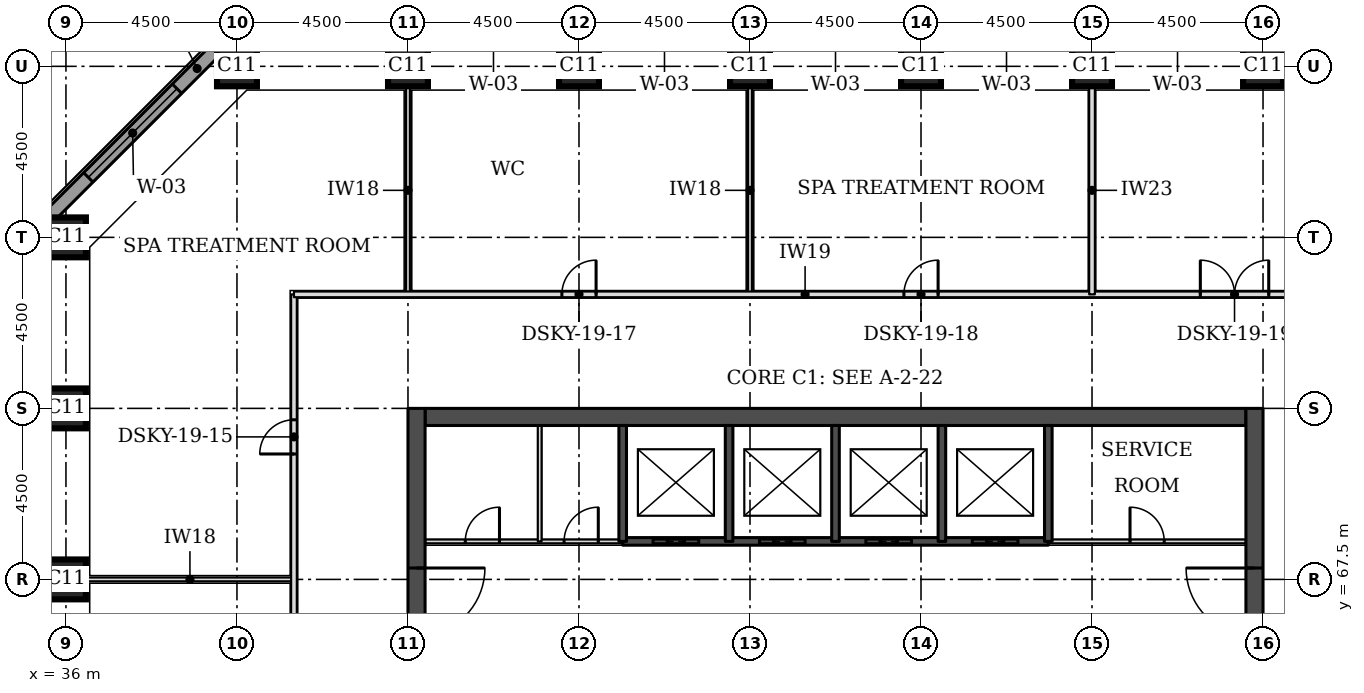
"""IFC4 building model, lengths in metres.
Left out: names, types, materials, properties, quantities, classifications, styles, units other than length and angle.
Written with IfcOpenShell. Run it as: python <this file> out.ifc"""

import sys

from ifc_helpers import new_model, si_unit, direction, frame, frame_2d, origin, origin_2d, place, context, subcontext, project, spatial, rectangle, extrude, element, fill, save


model = new_model("IFC4")
c1 = context("Model", 3, precision=1e-05, world=origin(), true_north=direction((0.0, 1.0)))
c2 = subcontext(c1, "Body", "Model", "MODEL_VIEW")
j1 = project(units=[si_unit("LENGTHUNIT", "METRE"), si_unit("PLANEANGLEUNIT", "RADIAN")], contexts=[c1])
p1 = place(None, origin())
s1 = spatial("IfcSite", under=j1, at=p1, CompositionType="ELEMENT")
p2 = place(p1, origin())
s2 = spatial("IfcBuilding", under=s1, at=p2, CompositionType="ELEMENT")
p3 = place(p2, frame((0.0, 0.0, 74.3)))
s3 = spatial("IfcBuildingStorey", under=s2, at=p3, CompositionType="ELEMENT", Elevation=74.3)
for number, where, z_axis, x_axis in (
    (1, (36.0, 67.5, 0.0), (0.0, 0.0, 1.0), (1.0, 0.0, 0.0)),
    (2, (36.0, 72.0, 0.0), (0.0, 0.0, 1.0), (1.0, 0.0, 0.0)),
    (3, (36.0, 76.5, 0.0), (0.0, 0.0, 1.0), (1.0, 0.0, 0.0)),
    (4, (40.5, 81.0, 0.0), (0.0, 0.0, 1.0), (1.0, 0.0, 0.0)),
    (5, (45.0, 81.0, 0.0), (0.0, 0.0, 1.0), (1.0, 0.0, 0.0)),
    (6, (49.5, 81.0, 0.0), (0.0, 0.0, 1.0), (1.0, 0.0, 0.0)),
    (7, (54.0, 81.0, 0.0), (0.0, 0.0, 1.0), (1.0, 0.0, 0.0)),
    (8, (58.5, 81.0, 0.0), (0.0, 0.0, 1.0), (1.0, 0.0, 0.0)),
    (9, (63.0, 81.0, 0.0), (0.0, 0.0, 1.0), (1.0, 0.0, 0.0)),
    (10, (67.5, 81.0, 0.0), (0.0, 0.0, 1.0), (1.0, 0.0, 0.0)),
):
    element("IfcColumn", number, at=place(p3, frame(where, z_axis=z_axis, x_axis=x_axis)), inside=s3, PredefinedType="COLUMN", context=c2, shape_type="SweptSolid", body=[
        extrude(rectangle(XDim=1.05, YDim=1.05, at=origin_2d()), origin(), (0.0, 0.0, 1.0), 4.6),
    ])
p4 = place(p3, frame((45.45, 71.775, 0.0), z_axis=(0.0, 0.0, 1.0), x_axis=(1.0, 0.0, 0.0)))
e11 = element("IfcWall", 11, at=p4, inside=s3, PredefinedType="SHEAR", context=c2, shape_type="SweptSolid", body=[
    extrude(rectangle(XDim=21.6, YDim=0.45, at=frame_2d((10.8, 0.0))), origin(), (0.0, 0.0, 1.0), 4.6),
])
p5 = place(p3, frame((45.225, 49.5, 0.0), z_axis=(0.0, 0.0, 1.0), x_axis=(0.0, 1.0, 0.0)))
e12 = element("IfcWall", 12, at=p5, inside=s3, PredefinedType="SHEAR", context=c2, shape_type="SweptSolid", body=[
    extrude(rectangle(XDim=22.5, YDim=0.45, at=frame_2d((11.25, 0.0))), origin(), (0.0, 0.0, 1.0), 4.6),
])
p6 = place(p5, frame((4.2, 0.0, 0.0)))
e13 = element("IfcOpeningElement", 13, at=p6, cuts=e12, PredefinedType="OPENING", context=c2, shape_type="SweptSolid", body=[
    extrude(rectangle(XDim=1.8, YDim=2.1, at=frame_2d((0.9, 1.05))), frame((0.0, 0.235, 0.0), z_axis=(0.0, -1.0, 0.0), x_axis=(1.0, 0.0, 0.0)), (0.0, 0.0, 1.0), 0.47),
])
p7 = place(p5, frame((6.9, 0.0, 0.0)))
e14 = element("IfcOpeningElement", 14, at=p7, cuts=e12, PredefinedType="OPENING", context=c2, shape_type="SweptSolid", body=[
    extrude(rectangle(XDim=1.1, YDim=2.1, at=frame_2d((0.55, 1.05))), frame((0.0, 0.235, 0.0), z_axis=(0.0, -1.0, 0.0), x_axis=(1.0, 0.0, 0.0)), (0.0, 0.0, 1.0), 0.47),
])
p8 = place(p5, frame((13.6, 0.0, 0.0)))
e15 = element("IfcOpeningElement", 15, at=p8, cuts=e12, PredefinedType="OPENING", context=c2, shape_type="SweptSolid", body=[
    extrude(rectangle(XDim=1.1, YDim=2.1, at=frame_2d((0.55, 1.05))), frame((0.0, 0.235, 0.0), z_axis=(0.0, -1.0, 0.0), x_axis=(1.0, 0.0, 0.0)), (0.0, 0.0, 1.0), 0.47),
])
p9 = place(p5, frame((16.5, 0.0, 0.0)))
e16 = element("IfcOpeningElement", 16, at=p9, cuts=e12, PredefinedType="OPENING", context=c2, shape_type="SweptSolid", body=[
    extrude(rectangle(XDim=1.8, YDim=2.1, at=frame_2d((0.9, 1.05))), frame((0.0, 0.235, 0.0), z_axis=(0.0, -1.0, 0.0), x_axis=(1.0, 0.0, 0.0)), (0.0, 0.0, 1.0), 0.47),
])
p10 = place(p3, frame((67.275, 49.5, 0.0), z_axis=(0.0, 0.0, 1.0), x_axis=(0.0, 1.0, 0.0)))
e17 = element("IfcWall", 17, at=p10, inside=s3, PredefinedType="SHEAR", context=c2, shape_type="SweptSolid", body=[
    extrude(rectangle(XDim=22.5, YDim=0.45, at=frame_2d((11.25, 0.0))), origin(), (0.0, 0.0, 1.0), 4.6),
])
p11 = place(p10, frame((4.2, 0.0, 0.0)))
e18 = element("IfcOpeningElement", 18, at=p11, cuts=e17, PredefinedType="OPENING", context=c2, shape_type="SweptSolid", body=[
    extrude(rectangle(XDim=1.8, YDim=2.1, at=frame_2d((0.9, 1.05))), frame((0.0, 0.235, 0.0), z_axis=(0.0, -1.0, 0.0), x_axis=(1.0, 0.0, 0.0)), (0.0, 0.0, 1.0), 0.47),
])
p12 = place(p10, frame((6.9, 0.0, 0.0)))
e19 = element("IfcOpeningElement", 19, at=p12, cuts=e17, PredefinedType="OPENING", context=c2, shape_type="SweptSolid", body=[
    extrude(rectangle(XDim=1.1, YDim=2.1, at=frame_2d((0.55, 1.05))), frame((0.0, 0.235, 0.0), z_axis=(0.0, -1.0, 0.0), x_axis=(1.0, 0.0, 0.0)), (0.0, 0.0, 1.0), 0.47),
])
p13 = place(p10, frame((13.6, 0.0, 0.0)))
e20 = element("IfcOpeningElement", 20, at=p13, cuts=e17, PredefinedType="OPENING", context=c2, shape_type="SweptSolid", body=[
    extrude(rectangle(XDim=1.1, YDim=2.1, at=frame_2d((0.55, 1.05))), frame((0.0, 0.235, 0.0), z_axis=(0.0, -1.0, 0.0), x_axis=(1.0, 0.0, 0.0)), (0.0, 0.0, 1.0), 0.47),
])
p14 = place(p10, frame((16.5, 0.0, 0.0)))
e21 = element("IfcOpeningElement", 21, at=p14, cuts=e17, PredefinedType="OPENING", context=c2, shape_type="SweptSolid", body=[
    extrude(rectangle(XDim=1.8, YDim=2.1, at=frame_2d((0.9, 1.05))), frame((0.0, 0.235, 0.0), z_axis=(0.0, -1.0, 0.0), x_axis=(1.0, 0.0, 0.0)), (0.0, 0.0, 1.0), 0.47),
])
p15 = place(p3, frame((40.261, 81.751, 0.0), z_axis=(0.0, 0.0, 1.0), x_axis=(-0.707106781187, -0.707106781187, 0.0)))
e22 = element("IfcWall", 22, at=p15, inside=s3, PredefinedType="STANDARD", context=c2, shape_type="SweptSolid", body=[
    extrude(rectangle(XDim=7.089, YDim=0.35, at=frame_2d((3.544, 0.0))), origin(), (0.0, 0.0, 1.0), 4.425),
])
p16 = place(p15, frame((1.894, 0.0, 0.9)))
e23 = element("IfcOpeningElement", 23, at=p16, cuts=e22, PredefinedType="OPENING", context=c2, shape_type="SweptSolid", body=[
    extrude(rectangle(XDim=3.3, YDim=2.7, at=frame_2d((1.65, 1.35))), frame((0.0, 0.185, 0.0), z_axis=(0.0, -1.0, 0.0), x_axis=(1.0, 0.0, 0.0)), (0.0, 0.0, 1.0), 0.37),
])
for number, where, z_axis, x_axis in (
    (24, (36.525, 67.5, 0.0), (0.0, 0.0, 1.0), (1.0, 0.0, 0.0)),
    (25, (45.0, 75.0, 0.0), (0.0, 0.0, 1.0), (0.0, 1.0, 0.0)),
    (26, (54.0, 75.0, 0.0), (0.0, 0.0, 1.0), (0.0, 1.0, 0.0)),
):
    element("IfcWall", number, at=place(p3, frame(where, z_axis=z_axis, x_axis=x_axis)), inside=s3, PredefinedType="PARTITIONING", context=c2, shape_type="SweptSolid", body=[
        extrude(rectangle(XDim=5.475, YDim=0.1, at=frame_2d((2.738, 0.0))), origin(), (0.0, 0.0, 1.0), 4.45),
    ])
p17 = place(p3, frame((42.0, 53.25, 0.0), z_axis=(0.0, 0.0, 1.0), x_axis=(0.0, 1.0, 0.0)))
e27 = element("IfcWall", 27, at=p17, inside=s3, PredefinedType="PARTITIONING", context=c2, shape_type="SweptSolid", body=[
    extrude(rectangle(XDim=21.75, YDim=0.15, at=frame_2d((10.875, 0.0))), origin(), (0.0, 0.0, 1.0), 4.45),
])
p18 = place(p17, frame((2.175, 0.0, 0.0)))
e28 = element("IfcOpeningElement", 28, at=p18, cuts=e27, PredefinedType="OPENING", context=c2, shape_type="SweptSolid", body=[
    extrude(rectangle(XDim=0.9, YDim=2.1, at=frame_2d((0.45, 1.05))), frame((0.0, 0.085, 0.0), z_axis=(0.0, -1.0, 0.0), x_axis=(1.0, 0.0, 0.0)), (0.0, 0.0, 1.0), 0.17),
])
p19 = place(p17, frame((9.3, 0.0, 0.0)))
e29 = element("IfcOpeningElement", 29, at=p19, cuts=e27, PredefinedType="OPENING", context=c2, shape_type="SweptSolid", body=[
    extrude(rectangle(XDim=0.9, YDim=2.1, at=frame_2d((0.45, 1.05))), frame((0.0, 0.085, 0.0), z_axis=(0.0, -1.0, 0.0), x_axis=(1.0, 0.0, 0.0)), (0.0, 0.0, 1.0), 0.17),
])
p20 = place(p17, frame((17.55, 0.0, 0.0)))
e30 = element("IfcOpeningElement", 30, at=p20, cuts=e27, PredefinedType="OPENING", context=c2, shape_type="SweptSolid", body=[
    extrude(rectangle(XDim=0.9, YDim=2.1, at=frame_2d((0.45, 1.05))), frame((0.0, 0.085, 0.0), z_axis=(0.0, -1.0, 0.0), x_axis=(1.0, 0.0, 0.0)), (0.0, 0.0, 1.0), 0.17),
])
p21 = place(p3, frame((42.0, 75.0, 0.0), z_axis=(0.0, 0.0, 1.0), x_axis=(1.0, 0.0, 0.0)))
e31 = element("IfcWall", 31, at=p21, inside=s3, PredefinedType="PARTITIONING", context=c2, shape_type="SweptSolid", body=[
    extrude(rectangle(XDim=28.5, YDim=0.15, at=frame_2d((14.25, 0.0))), origin(), (0.0, 0.0, 1.0), 4.45),
])
p22 = place(p21, frame((23.85, 0.0, 0.0)))
e32 = element("IfcOpeningElement", 32, at=p22, cuts=e31, PredefinedType="OPENING", context=c2, shape_type="SweptSolid", body=[
    extrude(rectangle(XDim=1.8, YDim=2.4, at=frame_2d((0.9, 1.2))), frame((0.0, 0.085, 0.0), z_axis=(0.0, -1.0, 0.0), x_axis=(1.0, 0.0, 0.0)), (0.0, 0.0, 1.0), 0.17),
])
p23 = place(p21, frame((7.05, 0.0, 0.0)))
e33 = element("IfcOpeningElement", 33, at=p23, cuts=e31, PredefinedType="OPENING", context=c2, shape_type="SweptSolid", body=[
    extrude(rectangle(XDim=0.9, YDim=2.1, at=frame_2d((0.45, 1.05))), frame((0.0, 0.085, 0.0), z_axis=(0.0, -1.0, 0.0), x_axis=(1.0, 0.0, 0.0)), (0.0, 0.0, 1.0), 0.17),
])
p24 = place(p21, frame((16.05, 0.0, 0.0)))
e34 = element("IfcOpeningElement", 34, at=p24, cuts=e31, PredefinedType="OPENING", context=c2, shape_type="SweptSolid", body=[
    extrude(rectangle(XDim=0.9, YDim=2.1, at=frame_2d((0.45, 1.05))), frame((0.0, 0.085, 0.0), z_axis=(0.0, -1.0, 0.0), x_axis=(1.0, 0.0, 0.0)), (0.0, 0.0, 1.0), 0.17),
])
p25 = place(p3, frame((63.0, 75.0, 0.0), z_axis=(0.0, 0.0, 1.0), x_axis=(0.0, 1.0, 0.0)))
e35 = element("IfcWall", 35, at=p25, inside=s3, PredefinedType="PARTITIONING", context=c2, shape_type="SweptSolid", body=[
    extrude(rectangle(XDim=5.475, YDim=0.15, at=frame_2d((2.738, 0.0))), origin(), (0.0, 0.0, 1.0), 4.45),
])
p26 = place(p3, frame((45.45, 68.5, 0.0), z_axis=(0.0, 0.0, 1.0), x_axis=(1.0, 0.0, 0.0)))
e36 = element("IfcWall", 36, at=p26, inside=s3, PredefinedType="PARTITIONING", context=c2, shape_type="SweptSolid", body=[
    extrude(rectangle(XDim=5.2, YDim=0.1, at=frame_2d((2.6, 0.0))), origin(), (0.0, 0.0, 1.0), 4.45),
])
p27 = place(p26, frame((1.058, 0.0, 0.0)))
e37 = element("IfcOpeningElement", 37, at=p27, cuts=e36, PredefinedType="OPENING", context=c2, shape_type="SweptSolid", body=[
    extrude(rectangle(XDim=0.9, YDim=2.1, at=frame_2d((0.45, 1.05))), frame((0.0, 0.06, 0.0), z_axis=(0.0, -1.0, 0.0), x_axis=(1.0, 0.0, 0.0)), (0.0, 0.0, 1.0), 0.12),
])
p28 = place(p26, frame((3.658, 0.0, 0.0)))
e38 = element("IfcOpeningElement", 38, at=p28, cuts=e36, PredefinedType="OPENING", context=c2, shape_type="SweptSolid", body=[
    extrude(rectangle(XDim=0.9, YDim=2.1, at=frame_2d((0.45, 1.05))), frame((0.0, 0.06, 0.0), z_axis=(0.0, -1.0, 0.0), x_axis=(1.0, 0.0, 0.0)), (0.0, 0.0, 1.0), 0.12),
])
p29 = place(p3, frame((61.85, 68.5, 0.0), z_axis=(0.0, 0.0, 1.0), x_axis=(1.0, 0.0, 0.0)))
e39 = element("IfcWall", 39, at=p29, inside=s3, PredefinedType="PARTITIONING", context=c2, shape_type="SweptSolid", body=[
    extrude(rectangle(XDim=5.2, YDim=0.1, at=frame_2d((2.6, 0.0))), origin(), (0.0, 0.0, 1.0), 4.45),
])
p30 = place(p29, frame((2.15, 0.0, 0.0)))
e40 = element("IfcOpeningElement", 40, at=p30, cuts=e39, PredefinedType="OPENING", context=c2, shape_type="SweptSolid", body=[
    extrude(rectangle(XDim=0.9, YDim=2.1, at=frame_2d((0.45, 1.05))), frame((0.0, 0.06, 0.0), z_axis=(0.0, -1.0, 0.0), x_axis=(1.0, 0.0, 0.0)), (0.0, 0.0, 1.0), 0.12),
])
p31 = place(p3, frame((50.65, 68.5, 0.0), z_axis=(0.0, 0.0, 1.0), x_axis=(1.0, 0.0, 0.0)))
e41 = element("IfcWall", 41, at=p31, inside=s3, PredefinedType="SOLIDWALL", context=c2, shape_type="SweptSolid", body=[
    extrude(rectangle(XDim=11.2, YDim=0.2, at=frame_2d((5.6, 0.0))), origin(), (0.0, 0.0, 1.0), 4.45),
])
p32 = place(p31, frame((0.8, 0.0, 0.0)))
e42 = element("IfcOpeningElement", 42, at=p32, cuts=e41, PredefinedType="OPENING", context=c2, shape_type="SweptSolid", body=[
    extrude(rectangle(XDim=1.2, YDim=2.1, at=frame_2d((0.6, 1.05))), frame((0.0, 0.11, 0.0), z_axis=(0.0, -1.0, 0.0), x_axis=(1.0, 0.0, 0.0)), (0.0, 0.0, 1.0), 0.22),
])
p33 = place(p31, frame((3.6, 0.0, 0.0)))
e43 = element("IfcOpeningElement", 43, at=p33, cuts=e41, PredefinedType="OPENING", context=c2, shape_type="SweptSolid", body=[
    extrude(rectangle(XDim=1.2, YDim=2.1, at=frame_2d((0.6, 1.05))), frame((0.0, 0.11, 0.0), z_axis=(0.0, -1.0, 0.0), x_axis=(1.0, 0.0, 0.0)), (0.0, 0.0, 1.0), 0.22),
])
p34 = place(p31, frame((6.4, 0.0, 0.0)))
e44 = element("IfcOpeningElement", 44, at=p34, cuts=e41, PredefinedType="OPENING", context=c2, shape_type="SweptSolid", body=[
    extrude(rectangle(XDim=1.2, YDim=2.1, at=frame_2d((0.6, 1.05))), frame((0.0, 0.11, 0.0), z_axis=(0.0, -1.0, 0.0), x_axis=(1.0, 0.0, 0.0)), (0.0, 0.0, 1.0), 0.22),
])
p35 = place(p31, frame((9.2, 0.0, 0.0)))
e45 = element("IfcOpeningElement", 45, at=p35, cuts=e41, PredefinedType="OPENING", context=c2, shape_type="SweptSolid", body=[
    extrude(rectangle(XDim=1.2, YDim=2.1, at=frame_2d((0.6, 1.05))), frame((0.0, 0.11, 0.0), z_axis=(0.0, -1.0, 0.0), x_axis=(1.0, 0.0, 0.0)), (0.0, 0.0, 1.0), 0.22),
])
p36 = place(p3, frame((48.466, 68.5, 0.0), z_axis=(0.0, 0.0, 1.0), x_axis=(0.0, 1.0, 0.0)))
e46 = element("IfcWall", 46, at=p36, inside=s3, PredefinedType="PARTITIONING", context=c2, shape_type="SweptSolid", body=[
    extrude(rectangle(XDim=3.05, YDim=0.1, at=frame_2d((1.525, 0.0))), origin(), (0.0, 0.0, 1.0), 4.45),
])
for number, where, z_axis, x_axis in (
    (47, (50.65, 68.5, 0.0), (0.0, 0.0, 1.0), (0.0, 1.0, 0.0)),
    (48, (53.45, 68.5, 0.0), (0.0, 0.0, 1.0), (0.0, 1.0, 0.0)),
    (49, (56.25, 68.5, 0.0), (0.0, 0.0, 1.0), (0.0, 1.0, 0.0)),
    (50, (59.05, 68.5, 0.0), (0.0, 0.0, 1.0), (0.0, 1.0, 0.0)),
    (51, (61.85, 68.5, 0.0), (0.0, 0.0, 1.0), (0.0, 1.0, 0.0)),
):
    element("IfcWall", number, at=place(p3, frame(where, z_axis=z_axis, x_axis=x_axis)), inside=s3, PredefinedType="SOLIDWALL", context=c2, shape_type="SweptSolid", body=[
        extrude(rectangle(XDim=3.05, YDim=0.2, at=frame_2d((1.525, 0.0))), origin(), (0.0, 0.0, 1.0), 4.45),
    ])
p37 = place(p16, origin())
e52 = element("IfcWindow", 52, at=p37, inside=s3, PartitioningType="SINGLE_PANEL", PredefinedType="WINDOW", context=c2, shape_type="SweptSolid", body=[
    extrude(rectangle(XDim=3.3, YDim=2.7, at=frame_2d((1.65, 1.35))), frame((0.0, 0.085, 0.0), z_axis=(0.0, -1.0, 0.0), x_axis=(1.0, 0.0, 0.0)), (0.0, 0.0, 1.0), 0.06),
])
fill(e23, e52)
p38 = place(p20, origin())
e53 = element("IfcDoor", 53, at=p38, inside=s3, OperationType="SINGLE_SWING_LEFT", PredefinedType="DOOR", context=c2, shape_type="SweptSolid", body=[
    extrude(rectangle(XDim=0.9, YDim=2.1, at=frame_2d((0.45, 1.05))), frame((0.0, 0.025, 0.0), z_axis=(0.0, -1.0, 0.0), x_axis=(1.0, 0.0, 0.0)), (0.0, 0.0, 1.0), 0.05),
])
fill(e30, e53)
p39 = place(p22, origin())
e54 = element("IfcDoor", 54, at=p39, inside=s3, OperationType="DOUBLE_DOOR_SINGLE_SWING", PredefinedType="DOOR", context=c2, shape_type="SweptSolid", body=[
    extrude(rectangle(XDim=1.8, YDim=2.4, at=frame_2d((0.9, 1.2))), frame((0.0, 0.025, 0.0), z_axis=(0.0, -1.0, 0.0), x_axis=(1.0, 0.0, 0.0)), (0.0, 0.0, 1.0), 0.05),
])
fill(e32, e54)
p40 = place(p23, origin())
e55 = element("IfcDoor", 55, at=p40, inside=s3, OperationType="SINGLE_SWING_RIGHT", PredefinedType="DOOR", context=c2, shape_type="SweptSolid", body=[
    extrude(rectangle(XDim=0.9, YDim=2.1, at=frame_2d((0.45, 1.05))), frame((0.0, 0.025, 0.0), z_axis=(0.0, -1.0, 0.0), x_axis=(1.0, 0.0, 0.0)), (0.0, 0.0, 1.0), 0.05),
])
fill(e33, e55)
p41 = place(p24, origin())
e56 = element("IfcDoor", 56, at=p41, inside=s3, OperationType="SINGLE_SWING_RIGHT", PredefinedType="DOOR", context=c2, shape_type="SweptSolid", body=[
    extrude(rectangle(XDim=0.9, YDim=2.1, at=frame_2d((0.45, 1.05))), frame((0.0, 0.025, 0.0), z_axis=(0.0, -1.0, 0.0), x_axis=(1.0, 0.0, 0.0)), (0.0, 0.0, 1.0), 0.05),
])
fill(e34, e56)
p42 = place(p32, origin())
e57 = element("IfcDoor", 57, at=p42, inside=s3, OperationType="DOUBLE_DOOR_SLIDING", PredefinedType="DOOR", context=c2, shape_type="SweptSolid", body=[
    extrude(rectangle(XDim=1.2, YDim=2.1, at=frame_2d((0.6, 1.05))), frame((0.0, 0.025, 0.0), z_axis=(0.0, -1.0, 0.0), x_axis=(1.0, 0.0, 0.0)), (0.0, 0.0, 1.0), 0.05),
])
fill(e42, e57)
p43 = place(p33, origin())
e58 = element("IfcDoor", 58, at=p43, inside=s3, OperationType="DOUBLE_DOOR_SLIDING", PredefinedType="DOOR", context=c2, shape_type="SweptSolid", body=[
    extrude(rectangle(XDim=1.2, YDim=2.1, at=frame_2d((0.6, 1.05))), frame((0.0, 0.025, 0.0), z_axis=(0.0, -1.0, 0.0), x_axis=(1.0, 0.0, 0.0)), (0.0, 0.0, 1.0), 0.05),
])
fill(e43, e58)
p44 = place(p34, origin())
e59 = element("IfcDoor", 59, at=p44, inside=s3, OperationType="DOUBLE_DOOR_SLIDING", PredefinedType="DOOR", context=c2, shape_type="SweptSolid", body=[
    extrude(rectangle(XDim=1.2, YDim=2.1, at=frame_2d((0.6, 1.05))), frame((0.0, 0.025, 0.0), z_axis=(0.0, -1.0, 0.0), x_axis=(1.0, 0.0, 0.0)), (0.0, 0.0, 1.0), 0.05),
])
fill(e44, e59)
p45 = place(p35, origin())
e60 = element("IfcDoor", 60, at=p45, inside=s3, OperationType="DOUBLE_DOOR_SLIDING", PredefinedType="DOOR", context=c2, shape_type="SweptSolid", body=[
    extrude(rectangle(XDim=1.2, YDim=2.1, at=frame_2d((0.6, 1.05))), frame((0.0, 0.025, 0.0), z_axis=(0.0, -1.0, 0.0), x_axis=(1.0, 0.0, 0.0)), (0.0, 0.0, 1.0), 0.05),
])
fill(e45, e60)
p46 = place(p9, frame((1.8, 0.0, 0.0), z_axis=(0.0, 0.0, 1.0), x_axis=(-1.0, 0.0, 0.0)))
e61 = element("IfcDoor", 61, at=p46, inside=s3, OperationType="SINGLE_SWING_LEFT", PredefinedType="DOOR", context=c2, shape_type="SweptSolid", body=[
    extrude(rectangle(XDim=1.8, YDim=2.1, at=frame_2d((0.9, 1.05))), frame((0.0, 0.025, 0.0), z_axis=(0.0, -1.0, 0.0), x_axis=(1.0, 0.0, 0.0)), (0.0, 0.0, 1.0), 0.05),
])
fill(e16, e61)
p47 = place(p14, origin())
e62 = element("IfcDoor", 62, at=p47, inside=s3, OperationType="SINGLE_SWING_RIGHT", PredefinedType="DOOR", context=c2, shape_type="SweptSolid", body=[
    extrude(rectangle(XDim=1.8, YDim=2.1, at=frame_2d((0.9, 1.05))), frame((0.0, 0.025, 0.0), z_axis=(0.0, -1.0, 0.0), x_axis=(1.0, 0.0, 0.0)), (0.0, 0.0, 1.0), 0.05),
])
fill(e21, e62)
p48 = place(p30, origin())
e63 = element("IfcDoor", 63, at=p48, inside=s3, OperationType="SINGLE_SWING_LEFT", PredefinedType="DOOR", context=c2, shape_type="SweptSolid", body=[
    extrude(rectangle(XDim=0.9, YDim=2.1, at=frame_2d((0.45, 1.05))), frame((0.0, 0.025, 0.0), z_axis=(0.0, -1.0, 0.0), x_axis=(1.0, 0.0, 0.0)), (0.0, 0.0, 1.0), 0.05),
])
fill(e40, e63)
p49 = place(p27, origin())
e64 = element("IfcDoor", 64, at=p49, inside=s3, OperationType="SINGLE_SWING_RIGHT", PredefinedType="DOOR", context=c2, shape_type="SweptSolid", body=[
    extrude(rectangle(XDim=0.9, YDim=2.1, at=frame_2d((0.45, 1.05))), frame((0.0, 0.025, 0.0), z_axis=(0.0, -1.0, 0.0), x_axis=(1.0, 0.0, 0.0)), (0.0, 0.0, 1.0), 0.05),
])
fill(e37, e64)
p50 = place(p28, origin())
e65 = element("IfcDoor", 65, at=p50, inside=s3, OperationType="SINGLE_SWING_RIGHT", PredefinedType="DOOR", context=c2, shape_type="SweptSolid", body=[
    extrude(rectangle(XDim=0.9, YDim=2.1, at=frame_2d((0.45, 1.05))), frame((0.0, 0.025, 0.0), z_axis=(0.0, -1.0, 0.0), x_axis=(1.0, 0.0, 0.0)), (0.0, 0.0, 1.0), 0.05),
])
fill(e38, e65)
save(model, sys.argv[1])
